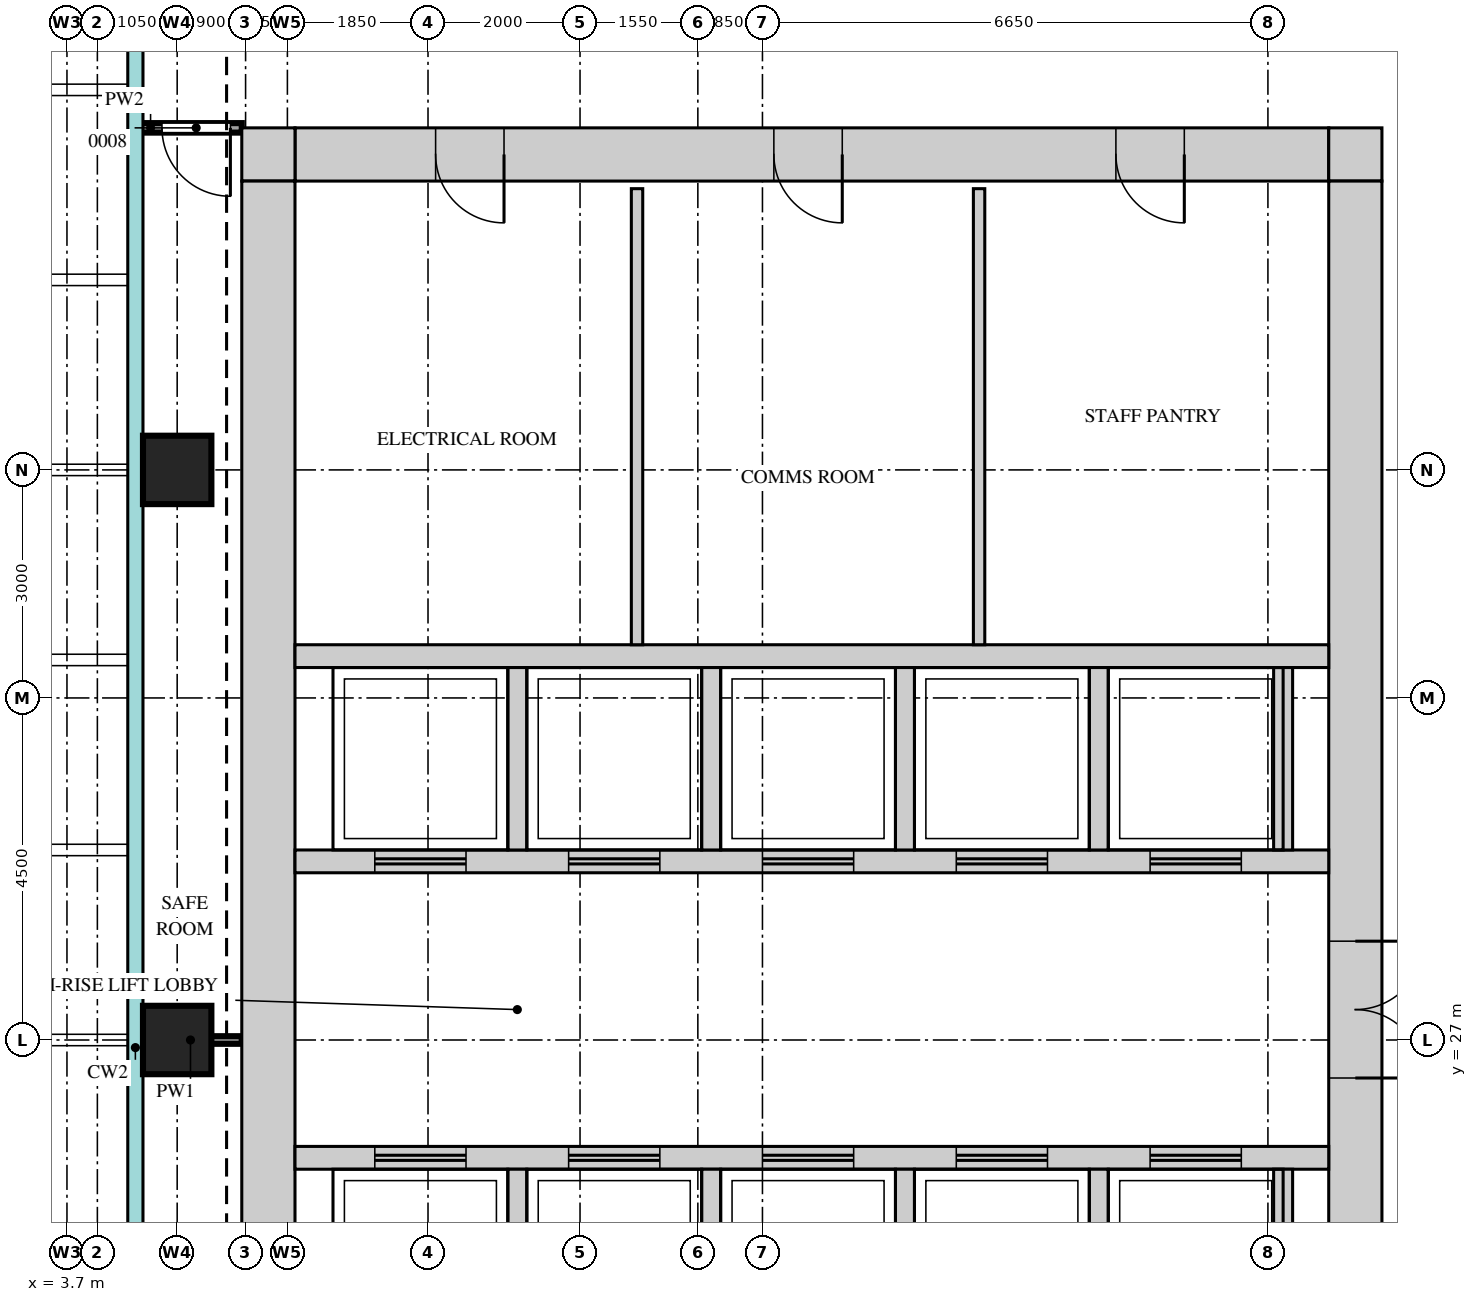
"""IFC4 building model, lengths in metres.
Left out: names, types, materials, properties, quantities, classifications, styles, units other than length and angle.
Written with IfcOpenShell. Run it as: python <this file> out.ifc"""

import sys

from ifc_helpers import new_model, si_unit, direction, frame, frame_2d, origin, origin_2d, place, context, subcontext, project, spatial, rectangle, extrude, source, transform, mapped, element, fill, save


model = new_model("IFC4")
c1 = context("Model", 3, precision=1e-05, world=origin(), true_north=direction((0.0, 1.0)))
c2 = subcontext(c1, "Body", "Model", "MODEL_VIEW")
j1 = project(units=[si_unit("LENGTHUNIT", "METRE"), si_unit("PLANEANGLEUNIT", "RADIAN")], contexts=[c1])
p1 = place(None, origin())
s1 = spatial("IfcSite", under=j1, at=p1, CompositionType="ELEMENT")
p2 = place(p1, origin())
s2 = spatial("IfcBuilding", under=s1, at=p2, CompositionType="ELEMENT")
p3 = place(p2, frame((0.0, 0.0, 234.2)))
s3 = spatial("IfcBuildingStorey", under=s2, at=p3, CompositionType="ELEMENT", Elevation=234.2)
m1 = source(origin(), c2, "Body", "SweptSolid", [
    extrude(rectangle(XDim=13.6, YDim=0.7, at=frame_2d((6.8, 0.0))), origin(), (0.0, 0.0, 1.0), 3.75),
])
p4 = place(p3, frame((6.7, 38.65, 0.0), z_axis=(0.0, 0.0, 1.0), x_axis=(1.0, 0.0, 0.0)))
e1 = element("IfcWall", 1, at=p4, inside=s3, PredefinedType="SHEAR", context=c2, shape_type="MappedRepresentation", body=[
    mapped(m1, transform((0.0, 0.0, 0.0))),
])
m2 = source(origin(), c2, "Body", "SweptSolid", [
    extrude(rectangle(XDim=0.9, YDim=2.1, at=frame_2d((0.45, 1.05))), frame((0.0, 0.36, 0.0), z_axis=(0.0, -1.0, 0.0), x_axis=(1.0, 0.0, 0.0)), (0.0, 0.0, 1.0), 0.72),
])
p5 = place(p4, frame((1.85, 0.0, 0.0)))
e2 = element("IfcOpeningElement", 2, at=p5, cuts=e1, PredefinedType="OPENING", context=c2, shape_type="MappedRepresentation", body=[
    mapped(m2, transform((0.0, 0.0, 0.0))),
])
p6 = place(p4, frame((6.3, 0.0, 0.0)))
e3 = element("IfcOpeningElement", 3, at=p6, cuts=e1, PredefinedType="OPENING", context=c2, shape_type="MappedRepresentation", body=[
    mapped(m2, transform((0.0, 0.0, 0.0))),
])
p7 = place(p4, frame((10.8, 0.0, 0.0)))
e4 = element("IfcOpeningElement", 4, at=p7, cuts=e1, PredefinedType="OPENING", context=c2, shape_type="MappedRepresentation", body=[
    mapped(m2, transform((0.0, 0.0, 0.0))),
])
m3 = source(origin(), c2, "Body", "SweptSolid", [
    extrude(rectangle(XDim=0.7, YDim=0.7, at=frame_2d((0.35, 0.0))), origin(), (0.0, 0.0, 1.0), 3.75),
])
for number, where, z_axis, x_axis in (
    (5, (20.3, 38.65, 0.0), (0.0, 0.0, 1.0), (1.0, 0.0, 0.0)),
    (6, (6.0, 38.65, 0.0), (0.0, 0.0, 1.0), (1.0, 0.0, 0.0)),
):
    element("IfcWall", number, at=place(p3, frame(where, z_axis=z_axis, x_axis=x_axis)), inside=s3, PredefinedType="SHEAR", context=c2, shape_type="MappedRepresentation", body=[
        mapped(m3, transform((0.0, 0.0, 0.0))),
    ])
m4 = source(origin(), c2, "Body", "SweptSolid", [
    extrude(rectangle(XDim=22.6, YDim=0.7, at=frame_2d((11.3, 0.0))), origin(), (0.0, 0.0, 1.0), 3.75),
])
p8 = place(p3, frame((20.65, 15.7, 0.0), z_axis=(0.0, 0.0, 1.0), x_axis=(0.0, 1.0, 0.0)))
e7 = element("IfcWall", 7, at=p8, inside=s3, PredefinedType="SHEAR", context=c2, shape_type="MappedRepresentation", body=[
    mapped(m4, transform((0.0, 0.0, 0.0))),
])
m5 = source(origin(), c2, "Body", "SweptSolid", [
    extrude(rectangle(XDim=1.8, YDim=2.1, at=frame_2d((0.9, 1.05))), frame((0.0, 0.36, 0.0), z_axis=(0.0, -1.0, 0.0), x_axis=(1.0, 0.0, 0.0)), (0.0, 0.0, 1.0), 0.72),
])
p9 = place(p8, frame((10.8, 0.0, 0.0)))
e8 = element("IfcOpeningElement", 8, at=p9, cuts=e7, PredefinedType="OPENING", context=c2, shape_type="MappedRepresentation", body=[
    mapped(m5, transform((0.0, 0.0, 0.0))),
])
p10 = place(p8, frame((0.45, 0.0, 0.0)))
e9 = element("IfcOpeningElement", 9, at=p10, cuts=e7, PredefinedType="OPENING", context=c2, shape_type="MappedRepresentation", body=[
    mapped(m2, transform((0.0, 0.0, 0.0))),
])
m6 = source(origin(), c2, "Body", "SweptSolid", [
    extrude(rectangle(XDim=1.0, YDim=2.1, at=frame_2d((0.5, 1.05))), frame((0.0, 0.36, 0.0), z_axis=(0.0, -1.0, 0.0), x_axis=(1.0, 0.0, 0.0)), (0.0, 0.0, 1.0), 0.72),
])
p11 = place(p8, frame((2.2, 0.0, 0.0)))
e10 = element("IfcOpeningElement", 10, at=p11, cuts=e7, PredefinedType="OPENING", context=c2, shape_type="MappedRepresentation", body=[
    mapped(m6, transform((0.0, 0.0, 0.0))),
])
p12 = place(p8, frame((5.0, 0.0, 0.0)))
e11 = element("IfcOpeningElement", 11, at=p12, cuts=e7, PredefinedType="OPENING", context=c2, shape_type="MappedRepresentation", body=[
    mapped(m2, transform((0.0, 0.0, 0.0))),
])
p13 = place(p3, frame((6.35, 15.7, 0.0), z_axis=(0.0, 0.0, 1.0), x_axis=(0.0, 1.0, 0.0)))
e12 = element("IfcWall", 12, at=p13, inside=s3, PredefinedType="SHEAR", context=c2, shape_type="MappedRepresentation", body=[
    mapped(m4, transform((0.0, 0.0, 0.0))),
])
m7 = source(origin(), c2, "Body", "SweptSolid", [
    extrude(rectangle(XDim=13.6, YDim=0.3, at=frame_2d((6.8, 0.0))), origin(), (0.0, 0.0, 1.0), 3.75),
])
p14 = place(p3, frame((6.7, 32.05, 0.0), z_axis=(0.0, 0.0, 1.0), x_axis=(1.0, 0.0, 0.0)))
e13 = element("IfcWall", 13, at=p14, inside=s3, PredefinedType="STANDARD", context=c2, shape_type="MappedRepresentation", body=[
    mapped(m7, transform((0.0, 0.0, 0.0))),
])
p15 = place(p3, frame((6.7, 29.35, 0.0), z_axis=(0.0, 0.0, 1.0), x_axis=(1.0, 0.0, 0.0)))
e14 = element("IfcWall", 14, at=p15, inside=s3, PredefinedType="STANDARD", context=c2, shape_type="MappedRepresentation", body=[
    mapped(m7, transform((0.0, 0.0, 0.0))),
])
m8 = source(origin(), c2, "Body", "SweptSolid", [
    extrude(rectangle(XDim=1.2, YDim=2.1, at=frame_2d((0.6, 1.05))), frame((0.0, 0.16, 0.0), z_axis=(0.0, -1.0, 0.0), x_axis=(1.0, 0.0, 0.0)), (0.0, 0.0, 1.0), 0.32),
])
p16 = place(p15, frame((1.05, 0.0, 0.0)))
e15 = element("IfcOpeningElement", 15, at=p16, cuts=e14, PredefinedType="OPENING", context=c2, shape_type="MappedRepresentation", body=[
    mapped(m8, transform((0.0, 0.0, 0.0))),
])
p17 = place(p15, frame((3.6, 0.0, 0.0)))
e16 = element("IfcOpeningElement", 16, at=p17, cuts=e14, PredefinedType="OPENING", context=c2, shape_type="MappedRepresentation", body=[
    mapped(m8, transform((0.0, 0.0, 0.0))),
])
p18 = place(p15, frame((6.15, 0.0, 0.0)))
e17 = element("IfcOpeningElement", 17, at=p18, cuts=e14, PredefinedType="OPENING", context=c2, shape_type="MappedRepresentation", body=[
    mapped(m8, transform((0.0, 0.0, 0.0))),
])
p19 = place(p15, frame((8.7, 0.0, 0.0)))
e18 = element("IfcOpeningElement", 18, at=p19, cuts=e14, PredefinedType="OPENING", context=c2, shape_type="MappedRepresentation", body=[
    mapped(m8, transform((0.0, 0.0, 0.0))),
])
p20 = place(p15, frame((11.25, 0.0, 0.0)))
e19 = element("IfcOpeningElement", 19, at=p20, cuts=e14, PredefinedType="OPENING", context=c2, shape_type="MappedRepresentation", body=[
    mapped(m8, transform((0.0, 0.0, 0.0))),
])
p21 = place(p3, frame((6.7, 25.45, 0.0), z_axis=(0.0, 0.0, 1.0), x_axis=(1.0, 0.0, 0.0)))
e20 = element("IfcWall", 20, at=p21, inside=s3, PredefinedType="STANDARD", context=c2, shape_type="MappedRepresentation", body=[
    mapped(m7, transform((0.0, 0.0, 0.0))),
])
p22 = place(p21, frame((1.05, 0.0, 0.0)))
e21 = element("IfcOpeningElement", 21, at=p22, cuts=e20, PredefinedType="OPENING", context=c2, shape_type="MappedRepresentation", body=[
    mapped(m8, transform((0.0, 0.0, 0.0))),
])
p23 = place(p21, frame((3.6, 0.0, 0.0)))
e22 = element("IfcOpeningElement", 22, at=p23, cuts=e20, PredefinedType="OPENING", context=c2, shape_type="MappedRepresentation", body=[
    mapped(m8, transform((0.0, 0.0, 0.0))),
])
p24 = place(p21, frame((6.15, 0.0, 0.0)))
e23 = element("IfcOpeningElement", 23, at=p24, cuts=e20, PredefinedType="OPENING", context=c2, shape_type="MappedRepresentation", body=[
    mapped(m8, transform((0.0, 0.0, 0.0))),
])
p25 = place(p21, frame((8.7, 0.0, 0.0)))
e24 = element("IfcOpeningElement", 24, at=p25, cuts=e20, PredefinedType="OPENING", context=c2, shape_type="MappedRepresentation", body=[
    mapped(m8, transform((0.0, 0.0, 0.0))),
])
p26 = place(p21, frame((11.25, 0.0, 0.0)))
e25 = element("IfcOpeningElement", 25, at=p26, cuts=e20, PredefinedType="OPENING", context=c2, shape_type="MappedRepresentation", body=[
    mapped(m8, transform((0.0, 0.0, 0.0))),
])
m9 = source(origin(), c2, "Body", "SweptSolid", [
    extrude(rectangle(XDim=2.4, YDim=0.25, at=frame_2d((1.2, 0.0))), origin(), (0.0, 0.0, 1.0), 3.75),
])
for number, where, z_axis, x_axis in (
    (26, (17.275, 29.5, 0.0), (0.0, 0.0, 1.0), (0.0, 1.0, 0.0)),
    (27, (19.7, 29.5, 0.0), (0.0, 0.0, 1.0), (0.0, 1.0, 0.0)),
    (28, (9.625, 29.5, 0.0), (0.0, 0.0, 1.0), (0.0, 1.0, 0.0)),
    (29, (12.175, 29.5, 0.0), (0.0, 0.0, 1.0), (0.0, 1.0, 0.0)),
    (30, (14.725, 29.5, 0.0), (0.0, 0.0, 1.0), (0.0, 1.0, 0.0)),
):
    element("IfcWall", number, at=place(p3, frame(where, z_axis=z_axis, x_axis=x_axis)), inside=s3, PredefinedType="STANDARD", context=c2, shape_type="MappedRepresentation", body=[
        mapped(m9, transform((0.0, 0.0, 0.0))),
    ])
m10 = source(origin(), c2, "Body", "SweptSolid", [
    extrude(rectangle(XDim=2.4, YDim=0.25, at=frame_2d((1.2, 0.0))), origin(), (0.0, 0.0, 1.0), 3.75),
])
for number, where, z_axis, x_axis in (
    (31, (17.275, 22.9, 0.0), (0.0, 0.0, 1.0), (0.0, 1.0, 0.0)),
    (32, (19.7, 22.9, 0.0), (0.0, 0.0, 1.0), (0.0, 1.0, 0.0)),
    (33, (9.625, 22.9, 0.0), (0.0, 0.0, 1.0), (0.0, 1.0, 0.0)),
    (34, (12.175, 22.9, 0.0), (0.0, 0.0, 1.0), (0.0, 1.0, 0.0)),
    (35, (14.725, 22.9, 0.0), (0.0, 0.0, 1.0), (0.0, 1.0, 0.0)),
):
    element("IfcWall", number, at=place(p3, frame(where, z_axis=z_axis, x_axis=x_axis)), inside=s3, PredefinedType="STANDARD", context=c2, shape_type="MappedRepresentation", body=[
        mapped(m10, transform((0.0, 0.0, 0.0))),
    ])
m11 = source(origin(), c2, "Body", "SweptSolid", [
    extrude(rectangle(XDim=0.9, YDim=0.9, at=origin_2d()), origin(), (0.0, 0.0, 1.0), 3.75),
])
for number, where, z_axis, x_axis in (
    (36, (5.15, 27.0, 0.0), (0.0, 0.0, 1.0), (1.0, 0.0, 0.0)),
    (37, (5.15, 34.5, 0.0), (0.0, 0.0, 1.0), (1.0, 0.0, 0.0)),
):
    element("IfcColumn", number, at=place(p3, frame(where, z_axis=z_axis, x_axis=x_axis)), inside=s3, PredefinedType="COLUMN", context=c2, shape_type="MappedRepresentation", body=[
        mapped(m11, transform((0.0, 0.0, 0.0))),
    ])
m12 = source(origin(), c2, "Body", "SweptSolid", [
    extrude(rectangle(XDim=1.35, YDim=0.1, at=frame_2d((0.675, 0.0))), origin(), (0.0, 0.0, 1.0), 3.8),
])
p27 = place(p3, frame((4.65, 27.0, 0.0), z_axis=(0.0, 0.0, 1.0), x_axis=(1.0, 0.0, 0.0)))
e38 = element("IfcWall", 38, at=p27, inside=s3, PredefinedType="PARTITIONING", context=c2, shape_type="MappedRepresentation", body=[
    mapped(m12, transform((0.0, 0.0, 0.0))),
])
m13 = source(origin(), c2, "Body", "SweptSolid", [
    extrude(rectangle(XDim=6.0, YDim=0.15, at=frame_2d((3.0, 0.0))), origin(), (0.0, 0.0, 1.0), 3.8),
])
for number, where, z_axis, x_axis in (
    (39, (11.2, 32.2, 0.0), (0.0, 0.0, 1.0), (0.0, 1.0, 0.0)),
    (40, (15.7, 32.2, 0.0), (0.0, 0.0, 1.0), (0.0, 1.0, 0.0)),
):
    element("IfcWall", number, at=place(p3, frame(where, z_axis=z_axis, x_axis=x_axis)), inside=s3, PredefinedType="PARTITIONING", context=c2, shape_type="MappedRepresentation", body=[
        mapped(m13, transform((0.0, 0.0, 0.0))),
    ])
m14 = source(origin(), c2, "Body", "SweptSolid", [
    extrude(rectangle(XDim=1.35, YDim=0.125, at=frame_2d((0.675, 0.0))), origin(), (0.0, 0.0, 1.0), 3.8),
])
p28 = place(p3, frame((4.65, 39.0, 0.0), z_axis=(0.0, 0.0, 1.0), x_axis=(1.0, 0.0, 0.0)))
e41 = element("IfcWall", 41, at=p28, inside=s3, PredefinedType="PARTITIONING", context=c2, shape_type="MappedRepresentation", body=[
    mapped(m14, transform((0.0, 0.0, 0.0))),
])
m15 = source(origin(), c2, "Body", "SweptSolid", [
    extrude(rectangle(XDim=0.9, YDim=2.1, at=frame_2d((0.45, 1.05))), frame((0.0, 0.073, 0.0), z_axis=(0.0, -1.0, 0.0), x_axis=(1.0, 0.0, 0.0)), (0.0, 0.0, 1.0), 0.145),
])
p29 = place(p28, frame((0.3, 0.0, 0.0)))
e42 = element("IfcOpeningElement", 42, at=p29, cuts=e41, PredefinedType="OPENING", context=c2, shape_type="MappedRepresentation", body=[
    mapped(m15, transform((0.0, 0.0, 0.0))),
])
m16 = source(origin(), c2, "Body", "SweptSolid", [
    extrude(rectangle(XDim=1.8, YDim=2.1, at=frame_2d((0.9, 1.05))), frame((0.0, 0.3, 0.0), z_axis=(0.0, -1.0, 0.0), x_axis=(1.0, 0.0, 0.0)), (0.0, 0.0, 1.0), 0.6),
])
p30 = place(p9, origin())
e43 = element("IfcDoor", 43, at=p30, inside=s3, OperationType="DOUBLE_DOOR_SINGLE_SWING", PredefinedType="DOOR", context=c2, shape_type="MappedRepresentation", body=[
    mapped(m16, transform((0.0, 0.0, 0.0))),
])
fill(e8, e43)
m17 = source(origin(), c2, "Body", "SweptSolid", [
    extrude(rectangle(XDim=0.9, YDim=2.1, at=frame_2d((0.45, 1.05))), frame((0.0, 0.3, 0.0), z_axis=(0.0, -1.0, 0.0), x_axis=(1.0, 0.0, 0.0)), (0.0, 0.0, 1.0), 0.6),
])
p31 = place(p5, origin())
e44 = element("IfcDoor", 44, at=p31, inside=s3, OperationType="SINGLE_SWING_RIGHT", PredefinedType="DOOR", context=c2, shape_type="MappedRepresentation", body=[
    mapped(m17, transform((0.0, 0.0, 0.0))),
])
fill(e2, e44)
p32 = place(p6, origin())
e45 = element("IfcDoor", 45, at=p32, inside=s3, OperationType="SINGLE_SWING_RIGHT", PredefinedType="DOOR", context=c2, shape_type="MappedRepresentation", body=[
    mapped(m17, transform((0.0, 0.0, 0.0))),
])
fill(e3, e45)
p33 = place(p7, origin())
e46 = element("IfcDoor", 46, at=p33, inside=s3, OperationType="SINGLE_SWING_RIGHT", PredefinedType="DOOR", context=c2, shape_type="MappedRepresentation", body=[
    mapped(m17, transform((0.0, 0.0, 0.0))),
])
fill(e4, e46)
m18 = source(origin(), c2, "Body", "SweptSolid", [
    extrude(rectangle(XDim=0.9, YDim=2.1, at=frame_2d((0.45, 1.05))), frame((0.0, 0.025, 0.0), z_axis=(0.0, -1.0, 0.0), x_axis=(1.0, 0.0, 0.0)), (0.0, 0.0, 1.0), 0.05),
])
p34 = place(p29, origin())
e47 = element("IfcDoor", 47, at=p34, inside=s3, OperationType="SINGLE_SWING_RIGHT", PredefinedType="DOOR", context=c2, shape_type="MappedRepresentation", body=[
    mapped(m18, transform((0.0, 0.0, 0.0))),
])
fill(e42, e47)
m19 = source(origin(), c2, "Body", "SweptSolid", [
    extrude(rectangle(XDim=1.2, YDim=2.1, at=frame_2d((0.6, 1.05))), frame((0.0, 0.025, 0.0), z_axis=(0.0, -1.0, 0.0), x_axis=(1.0, 0.0, 0.0)), (0.0, 0.0, 1.0), 0.05),
])
p35 = place(p22, origin())
e48 = element("IfcDoor", 48, at=p35, inside=s3, OperationType="DOUBLE_DOOR_SLIDING", PredefinedType="DOOR", context=c2, shape_type="MappedRepresentation", body=[
    mapped(m19, transform((0.0, 0.0, 0.0))),
])
fill(e21, e48)
p36 = place(p23, origin())
e49 = element("IfcDoor", 49, at=p36, inside=s3, OperationType="DOUBLE_DOOR_SLIDING", PredefinedType="DOOR", context=c2, shape_type="MappedRepresentation", body=[
    mapped(m19, transform((0.0, 0.0, 0.0))),
])
fill(e22, e49)
p37 = place(p24, origin())
e50 = element("IfcDoor", 50, at=p37, inside=s3, OperationType="DOUBLE_DOOR_SLIDING", PredefinedType="DOOR", context=c2, shape_type="MappedRepresentation", body=[
    mapped(m19, transform((0.0, 0.0, 0.0))),
])
fill(e23, e50)
p38 = place(p25, origin())
e51 = element("IfcDoor", 51, at=p38, inside=s3, OperationType="DOUBLE_DOOR_SLIDING", PredefinedType="DOOR", context=c2, shape_type="MappedRepresentation", body=[
    mapped(m19, transform((0.0, 0.0, 0.0))),
])
fill(e24, e51)
p39 = place(p26, origin())
e52 = element("IfcDoor", 52, at=p39, inside=s3, OperationType="DOUBLE_DOOR_SLIDING", PredefinedType="DOOR", context=c2, shape_type="MappedRepresentation", body=[
    mapped(m19, transform((0.0, 0.0, 0.0))),
])
fill(e25, e52)
p40 = place(p16, origin())
e53 = element("IfcDoor", 53, at=p40, inside=s3, OperationType="DOUBLE_DOOR_SLIDING", PredefinedType="DOOR", context=c2, shape_type="MappedRepresentation", body=[
    mapped(m19, transform((0.0, 0.0, 0.0))),
])
fill(e15, e53)
p41 = place(p17, origin())
e54 = element("IfcDoor", 54, at=p41, inside=s3, OperationType="DOUBLE_DOOR_SLIDING", PredefinedType="DOOR", context=c2, shape_type="MappedRepresentation", body=[
    mapped(m19, transform((0.0, 0.0, 0.0))),
])
fill(e16, e54)
p42 = place(p18, origin())
e55 = element("IfcDoor", 55, at=p42, inside=s3, OperationType="DOUBLE_DOOR_SLIDING", PredefinedType="DOOR", context=c2, shape_type="MappedRepresentation", body=[
    mapped(m19, transform((0.0, 0.0, 0.0))),
])
fill(e17, e55)
p43 = place(p19, origin())
e56 = element("IfcDoor", 56, at=p43, inside=s3, OperationType="DOUBLE_DOOR_SLIDING", PredefinedType="DOOR", context=c2, shape_type="MappedRepresentation", body=[
    mapped(m19, transform((0.0, 0.0, 0.0))),
])
fill(e18, e56)
p44 = place(p20, origin())
e57 = element("IfcDoor", 57, at=p44, inside=s3, OperationType="DOUBLE_DOOR_SLIDING", PredefinedType="DOOR", context=c2, shape_type="MappedRepresentation", body=[
    mapped(m19, transform((0.0, 0.0, 0.0))),
])
fill(e19, e57)
save(model, sys.argv[1])
